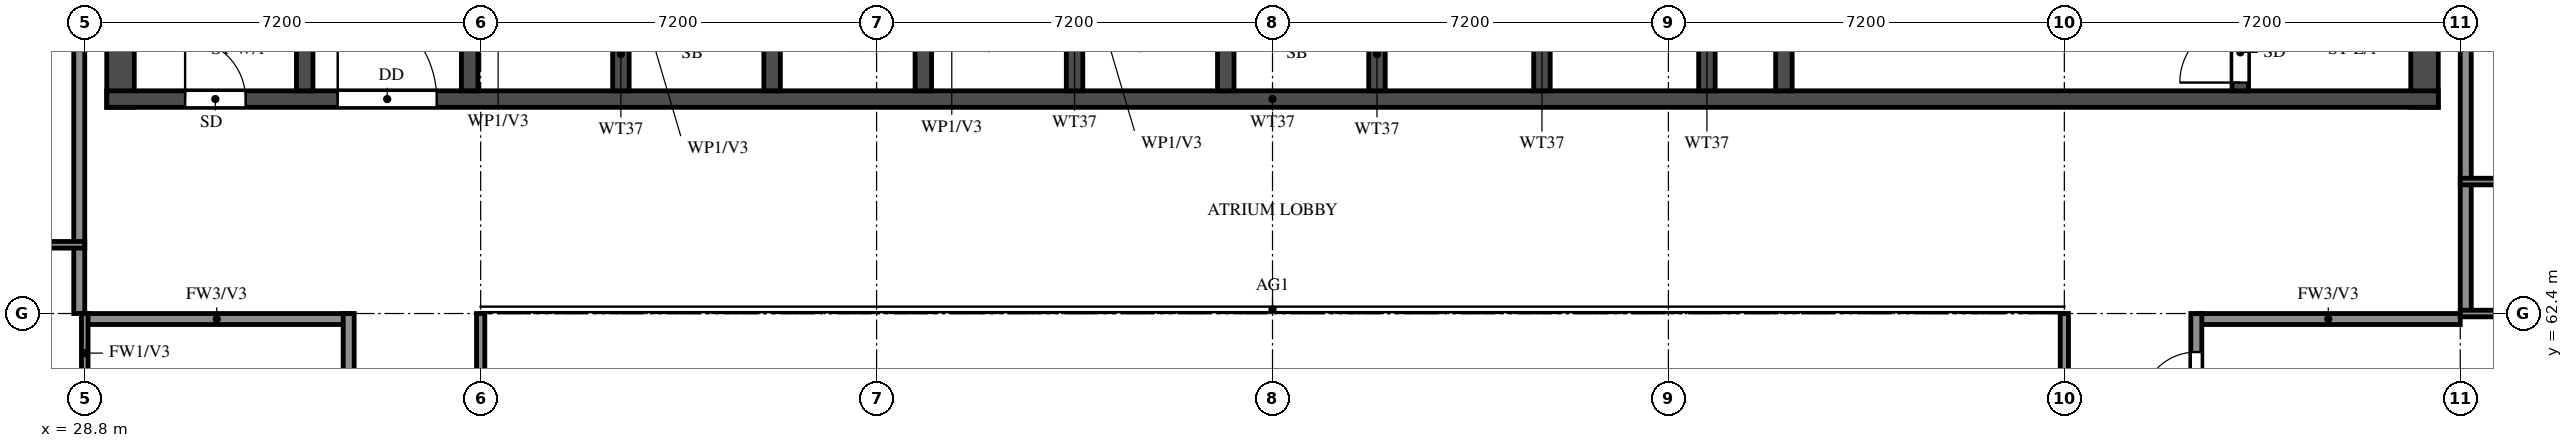
"""IFC4 building model, lengths in metres.
Left out: names, types, materials, properties, quantities, classifications, styles, units other than length and angle.
Written with IfcOpenShell. Run it as: python <this file> out.ifc"""

import sys

from ifc_helpers import new_model, si_unit, direction, frame, frame_2d, origin, place, context, subcontext, project, spatial, rectangle, extrude, element, fill, save


model = new_model("IFC4")
c1 = context("Model", 3, precision=1e-05, world=origin(), true_north=direction((0.0, 1.0)))
c2 = subcontext(c1, "Body", "Model", "MODEL_VIEW")
j1 = project(units=[si_unit("LENGTHUNIT", "METRE"), si_unit("PLANEANGLEUNIT", "RADIAN")], contexts=[c1])
p1 = place(None, origin())
s1 = spatial("IfcSite", under=j1, at=p1, CompositionType="ELEMENT")
p2 = place(p1, origin())
s2 = spatial("IfcBuilding", under=s1, at=p2, CompositionType="ELEMENT")
p3 = place(p2, frame((0.0, 0.0, 239.5)))
s3 = spatial("IfcBuildingStorey", under=s2, at=p3, CompositionType="ELEMENT", Elevation=239.5)
for number, where, z_axis, x_axis in (
    (1, (29.45, 66.15, 0.0), (0.0, 0.0, 1.0), (0.0, 1.0, 0.0)),
    (2, (71.35, 66.15, 0.0), (0.0, 0.0, 1.0), (0.0, 1.0, 0.0)),
):
    element("IfcWall", number, at=place(p3, frame(where, z_axis=z_axis, x_axis=x_axis)), inside=s3, PredefinedType="SHEAR", context=c2, shape_type="SweptSolid", body=[
        extrude(rectangle(XDim=11.85, YDim=0.5, at=frame_2d((5.925, 0.0))), origin(), (0.0, 0.0, 1.0), 3.22),
    ])
p4 = place(p3, frame((29.2, 66.3, 0.0), z_axis=(0.0, 0.0, 1.0), x_axis=(1.0, 0.0, 0.0)))
e3 = element("IfcWall", 3, at=p4, inside=s3, PredefinedType="SHEAR", context=c2, shape_type="SweptSolid", body=[
    extrude(rectangle(XDim=42.4, YDim=0.3, at=frame_2d((21.2, 0.0))), origin(), (0.0, 0.0, 1.0), 3.22),
])
p5 = place(p4, frame((1.425, 0.0, 0.0)))
e4 = element("IfcOpeningElement", 4, at=p5, cuts=e3, PredefinedType="OPENING", context=c2, shape_type="SweptSolid", body=[
    extrude(rectangle(XDim=1.1, YDim=2.1, at=frame_2d((0.55, 1.05))), frame((0.0, 0.16, 0.0), z_axis=(0.0, -1.0, 0.0), x_axis=(1.0, 0.0, 0.0)), (0.0, 0.0, 1.0), 0.32),
])
p6 = place(p4, frame((4.2, 0.0, 0.0)))
e5 = element("IfcOpeningElement", 5, at=p6, cuts=e3, PredefinedType="OPENING", context=c2, shape_type="SweptSolid", body=[
    extrude(rectangle(XDim=1.8, YDim=2.1, at=frame_2d((0.9, 1.05))), frame((0.0, 0.16, 0.0), z_axis=(0.0, -1.0, 0.0), x_axis=(1.0, 0.0, 0.0)), (0.0, 0.0, 1.0), 0.32),
])
p7 = place(p3, frame((32.8, 66.45, 0.0), z_axis=(0.0, 0.0, 1.0), x_axis=(0.0, 1.0, 0.0)))
e6 = element("IfcWall", 6, at=p7, inside=s3, PredefinedType="SHEAR", context=c2, shape_type="SweptSolid", body=[
    extrude(rectangle(XDim=11.05, YDim=0.3, at=frame_2d((5.525, 0.0))), origin(), (0.0, 0.0, 1.0), 3.22),
])
p8 = place(p3, frame((68.0, 66.45, 0.0), z_axis=(0.0, 0.0, 1.0), x_axis=(0.0, 1.0, 0.0)))
e7 = element("IfcWall", 7, at=p8, inside=s3, PredefinedType="SHEAR", context=c2, shape_type="SweptSolid", body=[
    extrude(rectangle(XDim=11.05, YDim=0.3, at=frame_2d((5.525, 0.0))), origin(), (0.0, 0.0, 1.0), 3.22),
])
p9 = place(p8, frame((0.15, 0.0, 0.0)))
e8 = element("IfcOpeningElement", 8, at=p9, cuts=e7, PredefinedType="OPENING", context=c2, shape_type="SweptSolid", body=[
    extrude(rectangle(XDim=1.1, YDim=2.1, at=frame_2d((0.55, 1.05))), frame((0.0, 0.16, 0.0), z_axis=(0.0, -1.0, 0.0), x_axis=(1.0, 0.0, 0.0)), (0.0, 0.0, 1.0), 0.32),
])
p10 = place(p3, frame((59.7, 66.45, 0.0), z_axis=(0.0, 0.0, 1.0), x_axis=(0.0, 1.0, 0.0)))
e9 = element("IfcWall", 9, at=p10, inside=s3, PredefinedType="SHEAR", context=c2, shape_type="SweptSolid", body=[
    extrude(rectangle(XDim=6.175, YDim=0.3, at=frame_2d((3.087, 0.0))), origin(), (0.0, 0.0, 1.0), 3.22),
])
p11 = place(p10, frame((3.85, 0.0, 0.0)))
e10 = element("IfcOpeningElement", 10, at=p11, cuts=e9, PredefinedType="OPENING", context=c2, shape_type="SweptSolid", body=[
    extrude(rectangle(XDim=1.2, YDim=2.1, at=frame_2d((0.6, 1.05))), frame((0.0, 0.16, 0.0), z_axis=(0.0, -1.0, 0.0), x_axis=(1.0, 0.0, 0.0)), (0.0, 0.0, 1.0), 0.32),
])
for number, where, z_axis, x_axis in (
    (11, (35.8, 66.45, 0.0), (0.0, 0.0, 1.0), (0.0, 1.0, 0.0)),
    (12, (38.55, 66.45, 0.0), (0.0, 0.0, 1.0), (0.0, 1.0, 0.0)),
    (13, (41.3, 66.45, 0.0), (0.0, 0.0, 1.0), (0.0, 1.0, 0.0)),
    (14, (44.05, 66.45, 0.0), (0.0, 0.0, 1.0), (0.0, 1.0, 0.0)),
    (15, (46.8, 66.45, 0.0), (0.0, 0.0, 1.0), (0.0, 1.0, 0.0)),
    (16, (49.55, 66.45, 0.0), (0.0, 0.0, 1.0), (0.0, 1.0, 0.0)),
    (17, (52.3, 66.45, 0.0), (0.0, 0.0, 1.0), (0.0, 1.0, 0.0)),
    (18, (55.3, 66.45, 0.0), (0.0, 0.0, 1.0), (0.0, 1.0, 0.0)),
    (19, (58.3, 66.45, 0.0), (0.0, 0.0, 1.0), (0.0, 1.0, 0.0)),
):
    element("IfcWall", number, at=place(p3, frame(where, z_axis=z_axis, x_axis=x_axis)), inside=s3, PredefinedType="SHEAR", context=c2, shape_type="SweptSolid", body=[
        extrude(rectangle(XDim=2.425, YDim=0.3, at=frame_2d((1.212, 0.0))), origin(), (0.0, 0.0, 1.0), 3.22),
    ])
for number, where, z_axis, x_axis in (
    (20, (28.8, 62.3, 0.0), (0.0, 0.0, 1.0), (1.0, 0.0, 0.0)),
    (21, (67.2, 62.3, 0.0), (0.0, 0.0, 1.0), (1.0, 0.0, 0.0)),
):
    element("IfcWall", number, at=place(p3, frame(where, z_axis=z_axis, x_axis=x_axis)), inside=s3, PredefinedType="SOLIDWALL", context=c2, shape_type="SweptSolid", body=[
        extrude(rectangle(XDim=4.8, YDim=0.2, at=frame_2d((2.4, 0.0))), origin(), (0.0, 0.0, 1.0), 3.22),
    ])
p12 = place(p3, frame((28.7, 62.4, 0.0), z_axis=(0.0, 0.0, 1.0), x_axis=(0.0, 1.0, 0.0)))
e22 = element("IfcWall", 22, at=p12, inside=s3, PredefinedType="SOLIDWALL", context=c2, shape_type="SweptSolid", body=[
    extrude(rectangle(XDim=15.6, YDim=0.2, at=frame_2d((7.8, 0.0))), origin(), (0.0, 0.0, 1.0), 3.22),
])
p13 = place(p3, frame((33.6, 50.4, 0.0), z_axis=(0.0, 0.0, 1.0), x_axis=(0.0, 1.0, 0.0)))
e23 = element("IfcWall", 23, at=p13, inside=s3, PredefinedType="SOLIDWALL", context=c2, shape_type="SweptSolid", body=[
    extrude(rectangle(XDim=12.0, YDim=0.2, at=frame_2d((6.0, 0.0))), origin(), (0.0, 0.0, 1.0), 3.22),
])
p14 = place(p13, frame((0.7, 0.0, 0.0)))
e24 = element("IfcOpeningElement", 24, at=p14, cuts=e23, PredefinedType="OPENING", context=c2, shape_type="SweptSolid", body=[
    extrude(rectangle(XDim=1.0, YDim=2.1, at=frame_2d((0.5, 1.05))), frame((0.0, 0.11, 0.0), z_axis=(0.0, -1.0, 0.0), x_axis=(1.0, 0.0, 0.0)), (0.0, 0.0, 1.0), 0.22),
])
p15 = place(p13, frame((9.7, 0.0, 0.0)))
e25 = element("IfcOpeningElement", 25, at=p15, cuts=e23, PredefinedType="OPENING", context=c2, shape_type="SweptSolid", body=[
    extrude(rectangle(XDim=1.0, YDim=2.1, at=frame_2d((0.5, 1.05))), frame((0.0, 0.11, 0.0), z_axis=(0.0, -1.0, 0.0), x_axis=(1.0, 0.0, 0.0)), (0.0, 0.0, 1.0), 0.22),
])
p16 = place(p3, frame((67.2, 45.6, 0.0), z_axis=(0.0, 0.0, 1.0), x_axis=(0.0, 1.0, 0.0)))
e26 = element("IfcWall", 26, at=p16, inside=s3, PredefinedType="SOLIDWALL", context=c2, shape_type="SweptSolid", body=[
    extrude(rectangle(XDim=16.8, YDim=0.2, at=frame_2d((8.4, 0.0))), origin(), (0.0, 0.0, 1.0), 3.22),
])
p17 = place(p16, frame((6.7, 0.0, 0.0)))
e27 = element("IfcOpeningElement", 27, at=p17, cuts=e26, PredefinedType="OPENING", context=c2, shape_type="SweptSolid", body=[
    extrude(rectangle(XDim=1.0, YDim=2.1, at=frame_2d((0.5, 1.05))), frame((0.0, 0.11, 0.0), z_axis=(0.0, -1.0, 0.0), x_axis=(1.0, 0.0, 0.0)), (0.0, 0.0, 1.0), 0.22),
])
p18 = place(p16, frame((15.1, 0.0, 0.0)))
e28 = element("IfcOpeningElement", 28, at=p18, cuts=e26, PredefinedType="OPENING", context=c2, shape_type="SweptSolid", body=[
    extrude(rectangle(XDim=1.0, YDim=2.1, at=frame_2d((0.5, 1.05))), frame((0.0, 0.11, 0.0), z_axis=(0.0, -1.0, 0.0), x_axis=(1.0, 0.0, 0.0)), (0.0, 0.0, 1.0), 0.22),
])
p19 = place(p16, frame((0.7, 0.0, 0.0)))
e29 = element("IfcOpeningElement", 29, at=p19, cuts=e26, PredefinedType="OPENING", context=c2, shape_type="SweptSolid", body=[
    extrude(rectangle(XDim=1.0, YDim=2.1, at=frame_2d((0.5, 1.05))), frame((0.0, 0.11, 0.0), z_axis=(0.0, -1.0, 0.0), x_axis=(1.0, 0.0, 0.0)), (0.0, 0.0, 1.0), 0.22),
])
p20 = place(p3, frame((72.1, 62.4, 0.0), z_axis=(0.0, 0.0, 1.0), x_axis=(0.0, 1.0, 0.0)))
e30 = element("IfcWall", 30, at=p20, inside=s3, PredefinedType="SOLIDWALL", context=c2, shape_type="SweptSolid", body=[
    extrude(rectangle(XDim=15.6, YDim=0.2, at=frame_2d((7.8, 0.0))), origin(), (0.0, 0.0, 1.0), 3.22),
])
p21 = place(p3, frame((72.0, 62.4, 0.0), z_axis=(0.0, 0.0, 1.0), x_axis=(1.0, 0.0, 0.0)))
e31 = element("IfcWall", 31, at=p21, inside=s3, PredefinedType="PARTITIONING", context=c2, shape_type="SweptSolid", body=[
    extrude(rectangle(XDim=2.4, YDim=0.12, at=frame_2d((1.2, 0.0))), origin(), (0.0, 0.0, 1.0), 3.22),
])
p22 = place(p21, frame((0.75, 0.0, 0.0)))
e32 = element("IfcOpeningElement", 32, at=p22, cuts=e31, PredefinedType="OPENING", context=c2, shape_type="SweptSolid", body=[
    extrude(rectangle(XDim=0.9, YDim=2.1, at=frame_2d((0.45, 1.05))), frame((0.0, 0.07, 0.0), z_axis=(0.0, -1.0, 0.0), x_axis=(1.0, 0.0, 0.0)), (0.0, 0.0, 1.0), 0.14),
])
for number, where, z_axis, x_axis in (
    (33, (25.3, 63.65, 0.0), (0.0, 0.0, 1.0), (1.0, 0.0, 0.0)),
    (34, (72.0, 64.8, 0.0), (0.0, 0.0, 1.0), (1.0, 0.0, 0.0)),
):
    element("IfcWall", number, at=place(p3, frame(where, z_axis=z_axis, x_axis=x_axis)), inside=s3, PredefinedType="PARTITIONING", context=c2, shape_type="SweptSolid", body=[
        extrude(rectangle(XDim=3.5, YDim=0.12, at=frame_2d((1.75, 0.0))), origin(), (0.0, 0.0, 1.0), 3.22),
    ])
p23 = place(p3, frame((28.8, 58.8, 0.0), z_axis=(0.0, 0.0, 1.0), x_axis=(0.0, 1.0, 0.0)))
e35 = element("IfcWall", 35, at=p23, inside=s3, PredefinedType="PARTITIONING", context=c2, shape_type="SweptSolid", body=[
    extrude(rectangle(XDim=3.6, YDim=0.12, at=frame_2d((1.8, 0.0))), origin(), (0.0, 0.0, 1.0), 3.22),
])
p24 = place(p23, frame((0.75, 0.0, 0.0)))
e36 = element("IfcOpeningElement", 36, at=p24, cuts=e35, PredefinedType="OPENING", context=c2, shape_type="SweptSolid", body=[
    extrude(rectangle(XDim=0.9, YDim=2.1, at=frame_2d((0.45, 1.05))), frame((0.0, 0.07, 0.0), z_axis=(0.0, -1.0, 0.0), x_axis=(1.0, 0.0, 0.0)), (0.0, 0.0, 1.0), 0.14),
])
for number, where, z_axis, x_axis in (
    (37, (36.0, 48.0, 0.0), (0.0, 0.0, 1.0), (0.0, 1.0, 0.0)),
    (38, (64.8, 48.0, 0.0), (0.0, 0.0, 1.0), (0.0, 1.0, 0.0)),
):
    element("IfcWall", number, at=place(p3, frame(where, z_axis=z_axis, x_axis=x_axis)), inside=s3, PredefinedType="SOLIDWALL", context=c2, shape_type="SweptSolid", body=[
        extrude(rectangle(XDim=14.4, YDim=0.15, at=frame_2d((7.2, 0.0))), origin(), (0.0, 0.0, 1.0), 2.32),
    ])
p25 = place(p5, origin())
e39 = element("IfcDoor", 39, at=p25, inside=s3, OperationType="SINGLE_SWING_LEFT", PredefinedType="DOOR", context=c2, shape_type="SweptSolid", body=[
    extrude(rectangle(XDim=1.1, YDim=2.1, at=frame_2d((0.55, 1.05))), frame((0.0, 0.025, 0.0), z_axis=(0.0, -1.0, 0.0), x_axis=(1.0, 0.0, 0.0)), (0.0, 0.0, 1.0), 0.05),
])
fill(e4, e39)
p26 = place(p9, origin())
e40 = element("IfcDoor", 40, at=p26, inside=s3, OperationType="SINGLE_SWING_RIGHT", PredefinedType="DOOR", context=c2, shape_type="SweptSolid", body=[
    extrude(rectangle(XDim=1.1, YDim=2.1, at=frame_2d((0.55, 1.05))), frame((0.0, 0.025, 0.0), z_axis=(0.0, -1.0, 0.0), x_axis=(1.0, 0.0, 0.0)), (0.0, 0.0, 1.0), 0.05),
])
fill(e8, e40)
p27 = place(p6, origin())
e41 = element("IfcDoor", 41, at=p27, inside=s3, OperationType="DOUBLE_DOOR_SINGLE_SWING", PredefinedType="DOOR", context=c2, shape_type="SweptSolid", body=[
    extrude(rectangle(XDim=1.8, YDim=2.1, at=frame_2d((0.9, 1.05))), frame((0.0, 0.025, 0.0), z_axis=(0.0, -1.0, 0.0), x_axis=(1.0, 0.0, 0.0)), (0.0, 0.0, 1.0), 0.05),
])
fill(e5, e41)
p28 = place(p18, origin())
e42 = element("IfcDoor", 42, at=p28, inside=s3, OperationType="SINGLE_SWING_LEFT", PredefinedType="DOOR", context=c2, shape_type="SweptSolid", body=[
    extrude(rectangle(XDim=1.0, YDim=2.1, at=frame_2d((0.5, 1.05))), frame((0.0, 0.025, 0.0), z_axis=(0.0, -1.0, 0.0), x_axis=(1.0, 0.0, 0.0)), (0.0, 0.0, 1.0), 0.05),
])
fill(e28, e42)
save(model, sys.argv[1])
